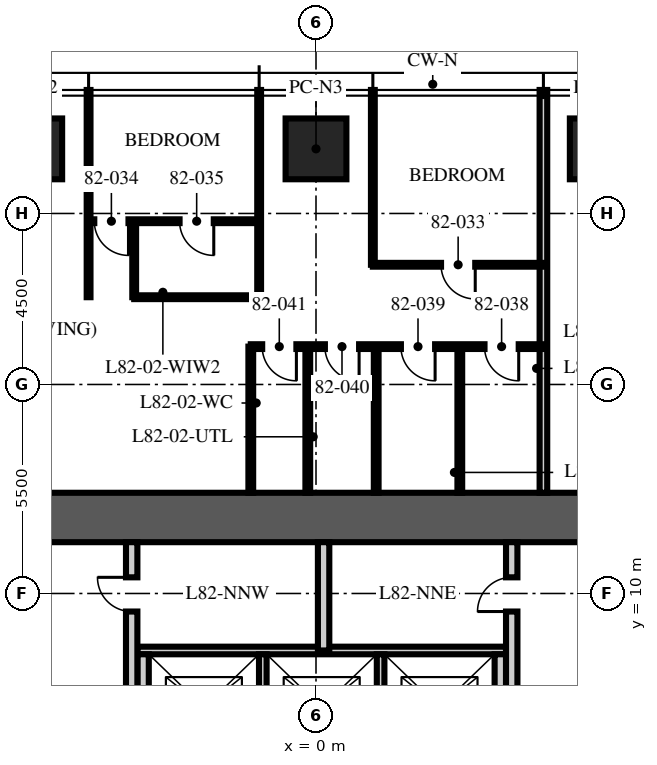
"""IFC4 building model, lengths in metres.
Left out: names, types, materials, properties, quantities, classifications, styles, units other than length and angle.
Written with IfcOpenShell. Run it as: python <this file> out.ifc"""

import sys

from ifc_helpers import new_model, si_unit, direction, frame, frame_2d, origin, origin_2d, place, context, subcontext, project, spatial, rectangle, extrude, element, fill, save


model = new_model("IFC4")
c1 = context("Model", 3, precision=1e-05, world=origin(), true_north=direction((0.0, 1.0)))
c2 = subcontext(c1, "Body", "Model", "MODEL_VIEW")
j1 = project(units=[si_unit("LENGTHUNIT", "METRE"), si_unit("PLANEANGLEUNIT", "RADIAN")], contexts=[c1])
p1 = place(None, origin())
s1 = spatial("IfcSite", under=j1, at=p1, CompositionType="ELEMENT")
p2 = place(p1, origin())
s2 = spatial("IfcBuilding", under=s1, at=p2, CompositionType="ELEMENT")
p3 = place(p2, frame((0.0, 0.0, 327.0)))
s3 = spatial("IfcBuildingStorey", under=s2, at=p3, CompositionType="ELEMENT", Elevation=327.0)
p4 = place(p3, frame((-15.5, 12.0, -0.25), z_axis=(0.0, 0.0, 1.0), x_axis=(1.0, 0.0, 0.0)))
e1 = element("IfcWall", 1, at=p4, inside=s3, PredefinedType="SHEAR", context=c2, shape_type="SweptSolid", body=[
    extrude(rectangle(XDim=31.0, YDim=1.3, at=frame_2d((15.5, 0.0))), origin(), (0.0, 0.0, 1.0), 3.75),
])
for number, where, z_axis, x_axis in (
    (2, (-7.48, 21.7, 0.0), (0.0, 0.0, 1.0), (1.0, 0.0, 0.0)),
    (3, (0.0, 21.7, 0.0), (0.0, 0.0, 1.0), (1.0, 0.0, 0.0)),
    (4, (7.48, 21.7, 0.0), (0.0, 0.0, 1.0), (1.0, 0.0, 0.0)),
):
    element("IfcColumn", number, at=place(p3, frame(where, z_axis=z_axis, x_axis=x_axis)), inside=s3, PredefinedType="COLUMN", context=c2, shape_type="SweptSolid", body=[
        extrude(rectangle(XDim=1.6, YDim=1.6, at=origin_2d()), origin(), (0.0, 0.0, 1.0), 3.75),
    ])
p5 = place(p3, frame((-4.7, 8.5, 0.0), z_axis=(0.0, 0.0, 1.0), x_axis=(1.0, 0.0, 0.0)))
e5 = element("IfcWall", 5, at=p5, inside=s3, PredefinedType="PARTITIONING", context=c2, shape_type="SweptSolid", body=[
    extrude(rectangle(XDim=9.7, YDim=0.2, at=frame_2d((4.85, 0.0))), origin(), (0.0, 0.0, 1.0), 3.5),
])
for number, where, z_axis, x_axis in (
    (6, (-4.55, 5.6, 0.0), (0.0, 0.0, 1.0), (0.0, 1.0, 0.0)),
    (7, (4.85, 5.6, 0.0), (0.0, 0.0, 1.0), (0.0, 1.0, 0.0)),
):
    element("IfcWall", number, at=place(p3, frame(where, z_axis=z_axis, x_axis=x_axis)), inside=s3, PredefinedType="PARTITIONING", context=c2, shape_type="SweptSolid", body=[
        extrude(rectangle(XDim=2.8, YDim=0.3, at=frame_2d((1.4, 0.0))), origin(), (0.0, 0.0, 1.0), 3.5),
    ])
for number, where, z_axis, x_axis in (
    (8, (-1.4, 5.6, 0.0), (0.0, 0.0, 1.0), (0.0, 1.0, 0.0)),
    (9, (1.7, 5.6, 0.0), (0.0, 0.0, 1.0), (0.0, 1.0, 0.0)),
):
    element("IfcWall", number, at=place(p3, frame(where, z_axis=z_axis, x_axis=x_axis)), inside=s3, PredefinedType="PARTITIONING", context=c2, shape_type="SweptSolid", body=[
        extrude(rectangle(XDim=2.8, YDim=0.2, at=frame_2d((1.4, 0.0))), origin(), (0.0, 0.0, 1.0), 3.5),
    ])
p6 = place(p3, frame((-4.85, 5.3, 0.0), z_axis=(0.0, 0.0, 1.0), x_axis=(0.0, 1.0, 0.0)))
e10 = element("IfcWall", 10, at=p6, inside=s3, PredefinedType="PARTITIONING", context=c2, shape_type="SweptSolid", body=[
    extrude(rectangle(XDim=6.05, YDim=0.3, at=frame_2d((3.025, 0.0))), origin(), (0.0, 0.0, 1.0), 3.5),
])
p7 = place(p6, frame((4.225, 0.0, 0.0)))
e11 = element("IfcOpeningElement", 11, at=p7, cuts=e10, PredefinedType="OPENING", context=c2, shape_type="SweptSolid", body=[
    extrude(rectangle(XDim=0.9, YDim=2.1, at=frame_2d((0.45, 1.05))), frame((0.0, 0.16, 0.0), z_axis=(0.0, -1.0, 0.0), x_axis=(1.0, 0.0, 0.0)), (0.0, 0.0, 1.0), 0.32),
])
p8 = place(p3, frame((5.15, 5.3, 0.0), z_axis=(0.0, 0.0, 1.0), x_axis=(0.0, 1.0, 0.0)))
e12 = element("IfcWall", 12, at=p8, inside=s3, PredefinedType="PARTITIONING", context=c2, shape_type="SweptSolid", body=[
    extrude(rectangle(XDim=6.05, YDim=0.3, at=frame_2d((3.025, 0.0))), origin(), (0.0, 0.0, 1.0), 3.5),
])
p9 = place(p8, frame((4.225, 0.0, 0.0)))
e13 = element("IfcOpeningElement", 13, at=p9, cuts=e12, PredefinedType="OPENING", context=c2, shape_type="SweptSolid", body=[
    extrude(rectangle(XDim=0.9, YDim=2.1, at=frame_2d((0.45, 1.05))), frame((0.0, 0.16, 0.0), z_axis=(0.0, -1.0, 0.0), x_axis=(1.0, 0.0, 0.0)), (0.0, 0.0, 1.0), 0.32),
])
p10 = place(p3, frame((0.2, 8.5, 0.0), z_axis=(0.0, 0.0, 1.0), x_axis=(0.0, 1.0, 0.0)))
e14 = element("IfcWall", 14, at=p10, inside=s3, PredefinedType="PARTITIONING", context=c2, shape_type="SweptSolid", body=[
    extrude(rectangle(XDim=2.85, YDim=0.3, at=frame_2d((1.425, 0.0))), origin(), (0.0, 0.0, 1.0), 3.5),
])
p11 = place(p3, frame((5.984, 12.65, 0.0), z_axis=(0.0, 0.0, 1.0), x_axis=(0.0, 1.0, 0.0)))
e15 = element("IfcWall", 15, at=p11, inside=s3, PredefinedType="PARTITIONING", context=c2, shape_type="SweptSolid", body=[
    extrude(rectangle(XDim=10.6, YDim=0.2, at=frame_2d((5.3, 0.0))), origin(), (0.0, 0.0, 1.0), 3.01),
])
p12 = place(p3, frame((1.496, 18.65, 0.0), z_axis=(0.0, 0.0, 1.0), x_axis=(0.0, 1.0, 0.0)))
e16 = element("IfcWall", 16, at=p12, inside=s3, PredefinedType="PARTITIONING", context=c2, shape_type="SweptSolid", body=[
    extrude(rectangle(XDim=4.6, YDim=0.1, at=frame_2d((2.3, 0.0))), origin(), (0.0, 0.0, 1.0), 3.01),
])
for number, where, z_axis, x_axis in (
    (17, (-1.496, 17.796, 0.0), (0.0, 0.0, 1.0), (0.0, 1.0, 0.0)),
    (18, (-5.984, 17.796, 0.0), (0.0, 0.0, 1.0), (0.0, 1.0, 0.0)),
):
    element("IfcWall", number, at=place(p3, frame(where, z_axis=z_axis, x_axis=x_axis)), inside=s3, PredefinedType="PARTITIONING", context=c2, shape_type="SweptSolid", body=[
        extrude(rectangle(XDim=5.454, YDim=0.1, at=frame_2d((2.727, 0.0))), origin(), (0.0, 0.0, 1.0), 3.01),
    ])
p13 = place(p3, frame((5.984, 18.65, 0.0), z_axis=(0.0, 0.0, 1.0), x_axis=(-1.0, 0.0, 0.0)))
e19 = element("IfcWall", 19, at=p13, inside=s3, PredefinedType="PARTITIONING", context=c2, shape_type="SweptSolid", body=[
    extrude(rectangle(XDim=4.488, YDim=0.1, at=frame_2d((2.244, 0.0))), origin(), (0.0, 0.0, 1.0), 2.91),
])
p14 = place(p13, frame((1.794, 0.0, 0.0)))
e20 = element("IfcOpeningElement", 20, at=p14, cuts=e19, PredefinedType="OPENING", context=c2, shape_type="SweptSolid", body=[
    extrude(rectangle(XDim=0.9, YDim=2.1, at=frame_2d((0.45, 1.05))), frame((0.0, 0.06, 0.0), z_axis=(0.0, -1.0, 0.0), x_axis=(1.0, 0.0, 0.0)), (0.0, 0.0, 1.0), 0.12),
])
p15 = place(p3, frame((-1.496, 19.796, 0.0), z_axis=(0.0, 0.0, 1.0), x_axis=(-1.0, 0.0, 0.0)))
e21 = element("IfcWall", 21, at=p15, inside=s3, PredefinedType="PARTITIONING", context=c2, shape_type="SweptSolid", body=[
    extrude(rectangle(XDim=4.488, YDim=0.1, at=frame_2d((2.244, 0.0))), origin(), (0.0, 0.0, 1.0), 2.91),
])
p16 = place(p15, frame((3.438, 0.0, 0.0)))
e22 = element("IfcOpeningElement", 22, at=p16, cuts=e21, PredefinedType="OPENING", context=c2, shape_type="SweptSolid", body=[
    extrude(rectangle(XDim=0.9, YDim=2.1, at=frame_2d((0.45, 1.05))), frame((0.0, 0.06, 0.0), z_axis=(0.0, -1.0, 0.0), x_axis=(1.0, 0.0, 0.0)), (0.0, 0.0, 1.0), 0.12),
])
p17 = place(p15, frame((1.194, 0.0, 0.0)))
e23 = element("IfcOpeningElement", 23, at=p17, cuts=e21, PredefinedType="OPENING", context=c2, shape_type="SweptSolid", body=[
    extrude(rectangle(XDim=0.9, YDim=2.1, at=frame_2d((0.45, 1.05))), frame((0.0, 0.06, 0.0), z_axis=(0.0, -1.0, 0.0), x_axis=(1.0, 0.0, 0.0)), (0.0, 0.0, 1.0), 0.12),
])
p18 = place(p3, frame((-4.784, 17.796, 0.0), z_axis=(0.0, 0.0, 1.0), x_axis=(0.0, 1.0, 0.0)))
e24 = element("IfcWall", 24, at=p18, inside=s3, PredefinedType="PARTITIONING", context=c2, shape_type="SweptSolid", body=[
    extrude(rectangle(XDim=2.0, YDim=0.1, at=frame_2d((1.0, 0.0))), origin(), (0.0, 0.0, 1.0), 3.5),
])
p19 = place(p3, frame((-1.496, 17.796, 0.0), z_axis=(0.0, 0.0, 1.0), x_axis=(-1.0, 0.0, 0.0)))
e25 = element("IfcWall", 25, at=p19, inside=s3, PredefinedType="PARTITIONING", context=c2, shape_type="SweptSolid", body=[
    extrude(rectangle(XDim=3.288, YDim=0.1, at=frame_2d((1.644, 0.0))), origin(), (0.0, 0.0, 1.0), 2.91),
])
p20 = place(p3, frame((5.984, 16.496, 0.0), z_axis=(0.0, 0.0, 1.0), x_axis=(-1.0, 0.0, 0.0)))
e26 = element("IfcWall", 26, at=p20, inside=s3, PredefinedType="PARTITIONING", context=c2, shape_type="SweptSolid", body=[
    extrude(rectangle(XDim=7.7, YDim=0.125, at=frame_2d((3.85, 0.0))), origin(), (0.0, 0.0, 1.0), 2.9),
])
p21 = place(p20, frame((0.65, 0.0, 0.0)))
e27 = element("IfcOpeningElement", 27, at=p21, cuts=e26, PredefinedType="OPENING", context=c2, shape_type="SweptSolid", body=[
    extrude(rectangle(XDim=0.9, YDim=2.1, at=frame_2d((0.45, 1.05))), frame((0.0, 0.073, 0.0), z_axis=(0.0, -1.0, 0.0), x_axis=(1.0, 0.0, 0.0)), (0.0, 0.0, 1.0), 0.145),
])
p22 = place(p20, frame((2.85, 0.0, 0.0)))
e28 = element("IfcOpeningElement", 28, at=p22, cuts=e26, PredefinedType="OPENING", context=c2, shape_type="SweptSolid", body=[
    extrude(rectangle(XDim=0.9, YDim=2.1, at=frame_2d((0.45, 1.05))), frame((0.0, 0.073, 0.0), z_axis=(0.0, -1.0, 0.0), x_axis=(1.0, 0.0, 0.0)), (0.0, 0.0, 1.0), 0.145),
])
p23 = place(p20, frame((4.85, 0.0, 0.0)))
e29 = element("IfcOpeningElement", 29, at=p23, cuts=e26, PredefinedType="OPENING", context=c2, shape_type="SweptSolid", body=[
    extrude(rectangle(XDim=0.9, YDim=2.1, at=frame_2d((0.45, 1.05))), frame((0.0, 0.073, 0.0), z_axis=(0.0, -1.0, 0.0), x_axis=(1.0, 0.0, 0.0)), (0.0, 0.0, 1.0), 0.145),
])
p24 = place(p20, frame((6.5, 0.0, 0.0)))
e30 = element("IfcOpeningElement", 30, at=p24, cuts=e26, PredefinedType="OPENING", context=c2, shape_type="SweptSolid", body=[
    extrude(rectangle(XDim=0.9, YDim=2.1, at=frame_2d((0.45, 1.05))), frame((0.0, 0.073, 0.0), z_axis=(0.0, -1.0, 0.0), x_axis=(1.0, 0.0, 0.0)), (0.0, 0.0, 1.0), 0.145),
])
p25 = place(p3, frame((3.784, 12.65, 0.0), z_axis=(0.0, 0.0, 1.0), x_axis=(0.0, 1.0, 0.0)))
e31 = element("IfcWall", 31, at=p25, inside=s3, PredefinedType="PARTITIONING", context=c2, shape_type="SweptSolid", body=[
    extrude(rectangle(XDim=3.846, YDim=0.125, at=frame_2d((1.923, 0.0))), origin(), (0.0, 0.0, 1.0), 2.91),
])
for number, where, z_axis, x_axis in (
    (32, (1.584, 12.65, 0.0), (0.0, 0.0, 1.0), (0.0, 1.0, 0.0)),
    (33, (-0.216, 12.65, 0.0), (0.0, 0.0, 1.0), (0.0, 1.0, 0.0)),
    (34, (-1.716, 12.65, 0.0), (0.0, 0.0, 1.0), (0.0, 1.0, 0.0)),
):
    element("IfcWall", number, at=place(p3, frame(where, z_axis=z_axis, x_axis=x_axis)), inside=s3, PredefinedType="PARTITIONING", context=c2, shape_type="SweptSolid", body=[
        extrude(rectangle(XDim=3.846, YDim=0.125, at=frame_2d((1.923, 0.0))), origin(), (0.0, 0.0, 1.0), 3.5),
    ])
p26 = place(p7, origin())
e35 = element("IfcDoor", 35, at=p26, inside=s3, OperationType="SINGLE_SWING_RIGHT", PredefinedType="DOOR", context=c2, shape_type="SweptSolid", body=[
    extrude(rectangle(XDim=0.9, YDim=2.1, at=frame_2d((0.45, 1.05))), frame((0.0, 0.025, 0.0), z_axis=(0.0, -1.0, 0.0), x_axis=(1.0, 0.0, 0.0)), (0.0, 0.0, 1.0), 0.05),
])
fill(e11, e35)
p27 = place(p9, origin())
e36 = element("IfcDoor", 36, at=p27, inside=s3, OperationType="SINGLE_SWING_LEFT", PredefinedType="DOOR", context=c2, shape_type="SweptSolid", body=[
    extrude(rectangle(XDim=0.9, YDim=2.1, at=frame_2d((0.45, 1.05))), frame((0.0, 0.025, 0.0), z_axis=(0.0, -1.0, 0.0), x_axis=(1.0, 0.0, 0.0)), (0.0, 0.0, 1.0), 0.05),
])
fill(e13, e36)
p28 = place(p14, origin())
e37 = element("IfcDoor", 37, at=p28, inside=s3, OperationType="SINGLE_SWING_LEFT", PredefinedType="DOOR", context=c2, shape_type="SweptSolid", body=[
    extrude(rectangle(XDim=0.9, YDim=2.1, at=frame_2d((0.45, 1.05))), frame((0.0, 0.025, 0.0), z_axis=(0.0, -1.0, 0.0), x_axis=(1.0, 0.0, 0.0)), (0.0, 0.0, 1.0), 0.05),
])
fill(e20, e37)
p29 = place(p16, origin())
e38 = element("IfcDoor", 38, at=p29, inside=s3, OperationType="SINGLE_SWING_LEFT", PredefinedType="DOOR", context=c2, shape_type="SweptSolid", body=[
    extrude(rectangle(XDim=0.9, YDim=2.1, at=frame_2d((0.45, 1.05))), frame((0.0, 0.025, 0.0), z_axis=(0.0, -1.0, 0.0), x_axis=(1.0, 0.0, 0.0)), (0.0, 0.0, 1.0), 0.05),
])
fill(e22, e38)
p30 = place(p17, origin())
e39 = element("IfcDoor", 39, at=p30, inside=s3, OperationType="SINGLE_SWING_LEFT", PredefinedType="DOOR", context=c2, shape_type="SweptSolid", body=[
    extrude(rectangle(XDim=0.9, YDim=2.1, at=frame_2d((0.45, 1.05))), frame((0.0, 0.025, 0.0), z_axis=(0.0, -1.0, 0.0), x_axis=(1.0, 0.0, 0.0)), (0.0, 0.0, 1.0), 0.05),
])
fill(e23, e39)
p31 = place(p21, origin())
e40 = element("IfcDoor", 40, at=p31, inside=s3, OperationType="SINGLE_SWING_LEFT", PredefinedType="DOOR", context=c2, shape_type="SweptSolid", body=[
    extrude(rectangle(XDim=0.9, YDim=2.1, at=frame_2d((0.45, 1.05))), frame((0.0, 0.025, 0.0), z_axis=(0.0, -1.0, 0.0), x_axis=(1.0, 0.0, 0.0)), (0.0, 0.0, 1.0), 0.05),
])
fill(e27, e40)
p32 = place(p22, origin())
e41 = element("IfcDoor", 41, at=p32, inside=s3, OperationType="SINGLE_SWING_LEFT", PredefinedType="DOOR", context=c2, shape_type="SweptSolid", body=[
    extrude(rectangle(XDim=0.9, YDim=2.1, at=frame_2d((0.45, 1.05))), frame((0.0, 0.025, 0.0), z_axis=(0.0, -1.0, 0.0), x_axis=(1.0, 0.0, 0.0)), (0.0, 0.0, 1.0), 0.05),
])
fill(e28, e41)
p33 = place(p23, origin())
e42 = element("IfcDoor", 42, at=p33, inside=s3, OperationType="SINGLE_SWING_LEFT", PredefinedType="DOOR", context=c2, shape_type="SweptSolid", body=[
    extrude(rectangle(XDim=0.9, YDim=2.1, at=frame_2d((0.45, 1.05))), frame((0.0, 0.025, 0.0), z_axis=(0.0, -1.0, 0.0), x_axis=(1.0, 0.0, 0.0)), (0.0, 0.0, 1.0), 0.05),
])
fill(e29, e42)
p34 = place(p24, origin())
e43 = element("IfcDoor", 43, at=p34, inside=s3, OperationType="SINGLE_SWING_LEFT", PredefinedType="DOOR", context=c2, shape_type="SweptSolid", body=[
    extrude(rectangle(XDim=0.9, YDim=2.1, at=frame_2d((0.45, 1.05))), frame((0.0, 0.025, 0.0), z_axis=(0.0, -1.0, 0.0), x_axis=(1.0, 0.0, 0.0)), (0.0, 0.0, 1.0), 0.05),
])
fill(e30, e43)
save(model, sys.argv[1])
